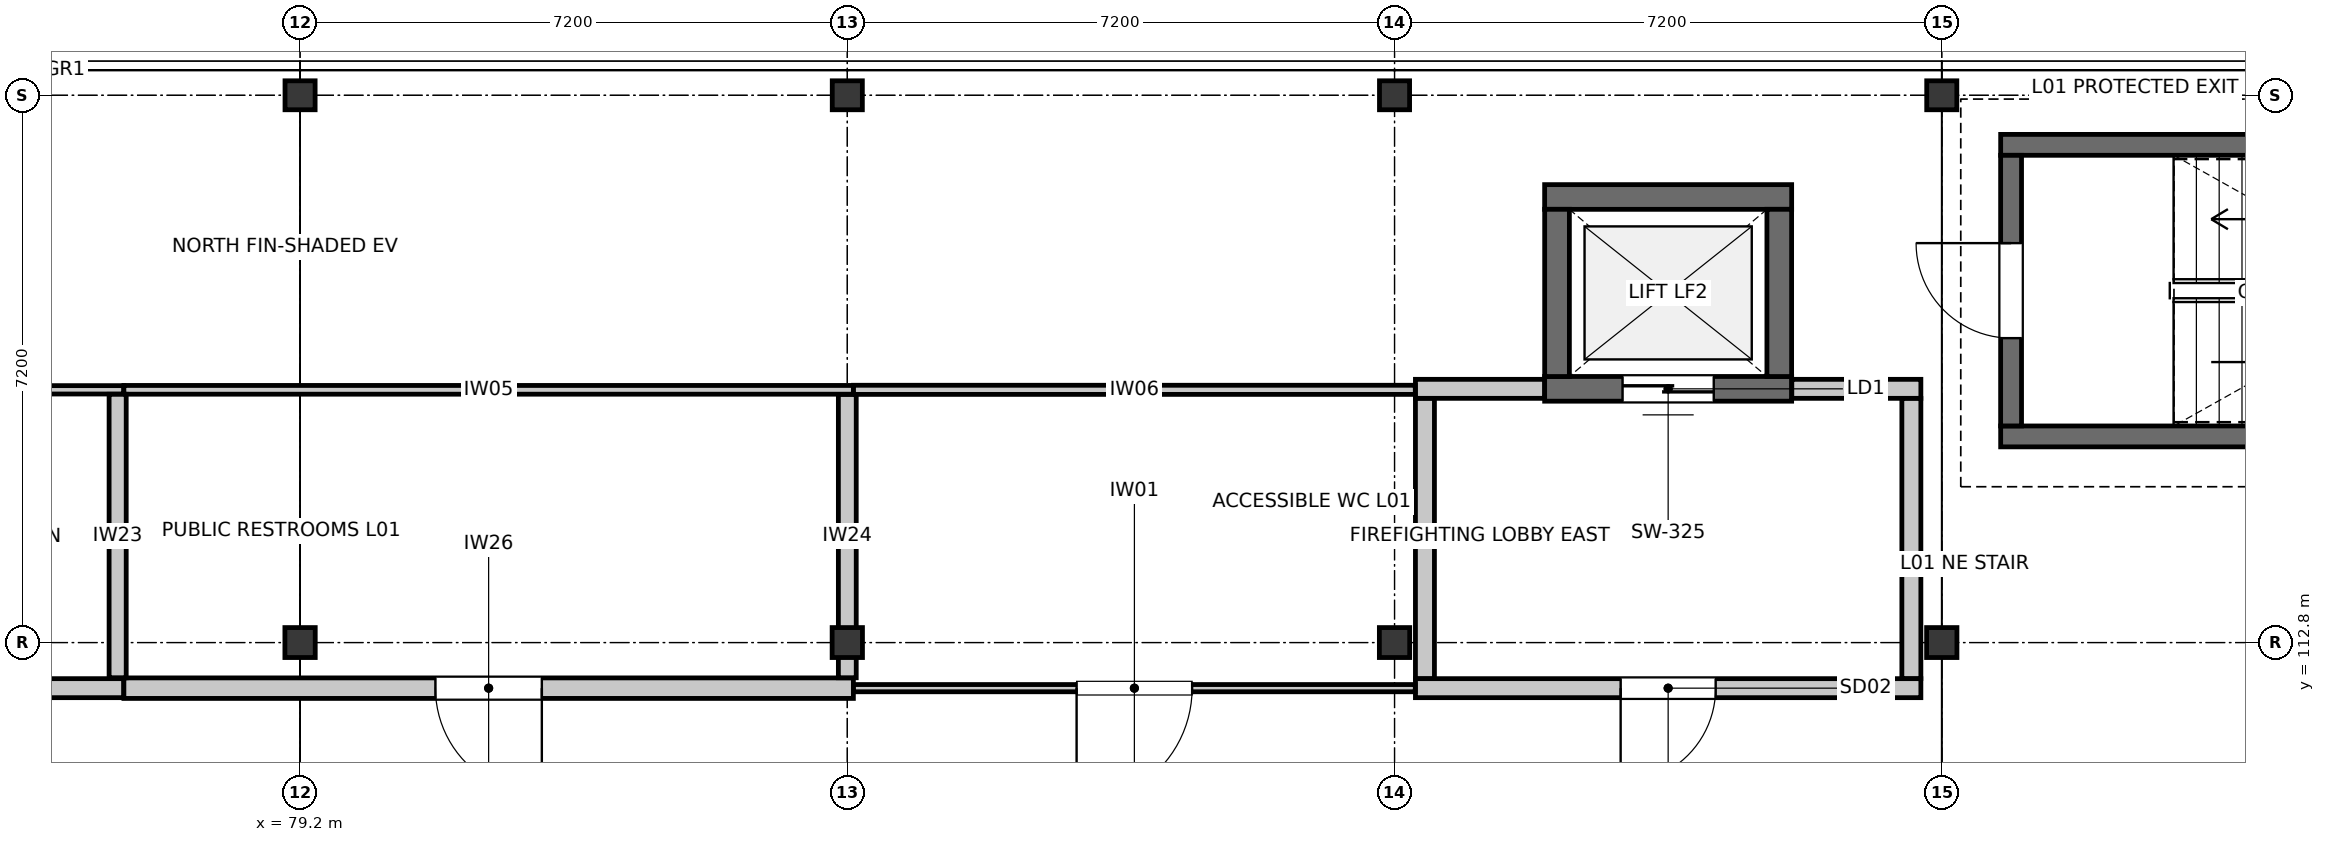
"""IFC4 building model, lengths in metres.
Left out: names, types, materials, properties, quantities, classifications, styles, units other than length and angle.
Written with IfcOpenShell. Run it as: python <this file> out.ifc"""

import sys

from ifc_helpers import new_model, si_unit, direction, frame, frame_2d, origin, origin_2d, place, context, subcontext, project, spatial, rectangle, i_section, extrude, element, fill, save


model = new_model("IFC4")
c1 = context("Model", 3, precision=1e-05, world=origin(), true_north=direction((0.0, 1.0)))
c2 = subcontext(c1, "Body", "Model", "MODEL_VIEW")
j1 = project(units=[si_unit("LENGTHUNIT", "METRE"), si_unit("PLANEANGLEUNIT", "RADIAN")], contexts=[c1])
p1 = place(None, origin())
s1 = spatial("IfcSite", under=j1, at=p1, CompositionType="ELEMENT")
p2 = place(p1, origin())
s2 = spatial("IfcBuilding", under=s1, at=p2, CompositionType="ELEMENT")
p3 = place(p2, frame((0.0, 0.0, 5.4)))
s3 = spatial("IfcBuildingStorey", under=s2, at=p3, CompositionType="ELEMENT", Elevation=5.4)
p4 = place(p3, frame((79.2, 112.8, 0.0), z_axis=(0.0, 0.0, 1.0), x_axis=(1.0, 0.0, 0.0)))
e1 = element("IfcColumn", 1, at=p4, inside=s3, PredefinedType="COLUMN", context=c2, shape_type="SweptSolid", body=[
    extrude(i_section(OverallWidth=0.399, OverallDepth=0.394, WebThickness=0.023, FlangeThickness=0.037, FilletRadius=0.015, at=origin_2d()), origin(), (0.0, 0.0, 1.0), 3.9),
])
p5 = place(p3, frame((79.2, 120.0, 0.0), z_axis=(0.0, 0.0, 1.0), x_axis=(1.0, 0.0, 0.0)))
e2 = element("IfcColumn", 2, at=p5, inside=s3, PredefinedType="COLUMN", context=c2, shape_type="SweptSolid", body=[
    extrude(i_section(OverallWidth=0.396, OverallDepth=0.381, WebThickness=0.019, FlangeThickness=0.03, FilletRadius=0.015, at=origin_2d()), origin(), (0.0, 0.0, 1.0), 3.9),
])
p6 = place(p3, frame((86.4, 112.8, 0.0), z_axis=(0.0, 0.0, 1.0), x_axis=(1.0, 0.0, 0.0)))
e3 = element("IfcColumn", 3, at=p6, inside=s3, PredefinedType="COLUMN", context=c2, shape_type="SweptSolid", body=[
    extrude(i_section(OverallWidth=0.399, OverallDepth=0.394, WebThickness=0.023, FlangeThickness=0.037, FilletRadius=0.015, at=origin_2d()), origin(), (0.0, 0.0, 1.0), 3.9),
])
p7 = place(p3, frame((86.4, 120.0, 0.0), z_axis=(0.0, 0.0, 1.0), x_axis=(1.0, 0.0, 0.0)))
e4 = element("IfcColumn", 4, at=p7, inside=s3, PredefinedType="COLUMN", context=c2, shape_type="SweptSolid", body=[
    extrude(i_section(OverallWidth=0.396, OverallDepth=0.381, WebThickness=0.019, FlangeThickness=0.03, FilletRadius=0.015, at=origin_2d()), origin(), (0.0, 0.0, 1.0), 3.9),
])
p8 = place(p3, frame((93.6, 112.8, 0.0), z_axis=(0.0, 0.0, 1.0), x_axis=(1.0, 0.0, 0.0)))
e5 = element("IfcColumn", 5, at=p8, inside=s3, PredefinedType="COLUMN", context=c2, shape_type="SweptSolid", body=[
    extrude(i_section(OverallWidth=0.399, OverallDepth=0.394, WebThickness=0.023, FlangeThickness=0.037, FilletRadius=0.015, at=origin_2d()), origin(), (0.0, 0.0, 1.0), 3.9),
])
p9 = place(p3, frame((93.6, 120.0, 0.0), z_axis=(0.0, 0.0, 1.0), x_axis=(1.0, 0.0, 0.0)))
e6 = element("IfcColumn", 6, at=p9, inside=s3, PredefinedType="COLUMN", context=c2, shape_type="SweptSolid", body=[
    extrude(i_section(OverallWidth=0.396, OverallDepth=0.381, WebThickness=0.019, FlangeThickness=0.03, FilletRadius=0.015, at=origin_2d()), origin(), (0.0, 0.0, 1.0), 3.9),
])
p10 = place(p3, frame((100.8, 112.8, 0.0), z_axis=(0.0, 0.0, 1.0), x_axis=(1.0, 0.0, 0.0)))
e7 = element("IfcColumn", 7, at=p10, inside=s3, PredefinedType="COLUMN", context=c2, shape_type="SweptSolid", body=[
    extrude(i_section(OverallWidth=0.399, OverallDepth=0.394, WebThickness=0.023, FlangeThickness=0.037, FilletRadius=0.015, at=origin_2d()), origin(), (0.0, 0.0, 1.0), 3.9),
])
p11 = place(p3, frame((100.8, 120.0, 0.0), z_axis=(0.0, 0.0, 1.0), x_axis=(1.0, 0.0, 0.0)))
e8 = element("IfcColumn", 8, at=p11, inside=s3, PredefinedType="COLUMN", context=c2, shape_type="SweptSolid", body=[
    extrude(i_section(OverallWidth=0.396, OverallDepth=0.381, WebThickness=0.019, FlangeThickness=0.03, FilletRadius=0.015, at=origin_2d()), origin(), (0.0, 0.0, 1.0), 3.9),
])
for number, where, z_axis, x_axis in (
    (9, (110.475, 115.512, 0.0), (0.0, 0.0, 1.0), (-1.0, 0.0, 0.0)),
    (10, (101.575, 119.348, 0.0), (0.0, 0.0, 1.0), (1.0, 0.0, 0.0)),
):
    element("IfcWall", number, at=place(p3, frame(where, z_axis=z_axis, x_axis=x_axis)), inside=s3, PredefinedType="SOLIDWALL", context=c2, shape_type="SweptSolid", body=[
        extrude(rectangle(XDim=8.9, YDim=0.275, at=frame_2d((4.45, 0.0))), origin(), (0.0, 0.0, 1.0), 3.67),
    ])
p12 = place(p3, frame((101.712, 115.65, 0.0), z_axis=(0.0, 0.0, 1.0), x_axis=(0.0, 1.0, 0.0)))
e11 = element("IfcWall", 11, at=p12, inside=s3, PredefinedType="SOLIDWALL", context=c2, shape_type="SweptSolid", body=[
    extrude(rectangle(XDim=3.56, YDim=0.275, at=frame_2d((1.78, 0.0))), origin(), (0.0, 0.0, 1.0), 3.67),
])
p13 = place(p12, frame((1.155, 0.0, 0.0)))
e12 = element("IfcOpeningElement", 12, at=p13, cuts=e11, PredefinedType="OPENING", context=c2, shape_type="SweptSolid", body=[
    extrude(rectangle(XDim=1.25, YDim=2.2, at=frame_2d((0.625, 1.1))), frame((0.0, 0.147, 0.0), z_axis=(0.0, -1.0, 0.0), x_axis=(1.0, 0.0, 0.0)), (0.0, 0.0, 1.0), 0.295),
])
p14 = place(p3, frame((98.825, 116.138, 0.0), z_axis=(0.0, 0.0, 1.0), x_axis=(-1.0, 0.0, 0.0)))
e13 = element("IfcWall", 13, at=p14, inside=s3, PredefinedType="SHEAR", context=c2, shape_type="SweptSolid", body=[
    extrude(rectangle(XDim=3.25, YDim=0.325, at=frame_2d((1.625, 0.0))), origin(), (0.0, 0.0, 1.0), 3.67),
])
p15 = place(p14, frame((1.025, 0.0, 0.0)))
e14 = element("IfcOpeningElement", 14, at=p15, cuts=e13, PredefinedType="OPENING", context=c2, shape_type="SweptSolid", body=[
    extrude(rectangle(XDim=1.2, YDim=2.2, at=frame_2d((0.6, 1.1))), frame((0.0, 0.172, 0.0), z_axis=(0.0, -1.0, 0.0), x_axis=(1.0, 0.0, 0.0)), (0.0, 0.0, 1.0), 0.345),
])
p16 = place(p3, frame((95.575, 118.662, 0.0), z_axis=(0.0, 0.0, 1.0), x_axis=(1.0, 0.0, 0.0)))
e15 = element("IfcWall", 15, at=p16, inside=s3, PredefinedType="SHEAR", context=c2, shape_type="SweptSolid", body=[
    extrude(rectangle(XDim=3.25, YDim=0.325, at=frame_2d((1.625, 0.0))), origin(), (0.0, 0.0, 1.0), 3.67),
])
for number, where, z_axis, x_axis in (
    (16, (95.738, 116.3, 0.0), (0.0, 0.0, 1.0), (0.0, 1.0, 0.0)),
    (17, (98.662, 118.5, 0.0), (0.0, 0.0, 1.0), (0.0, -1.0, 0.0)),
):
    element("IfcWall", number, at=place(p3, frame(where, z_axis=z_axis, x_axis=x_axis)), inside=s3, PredefinedType="SHEAR", context=c2, shape_type="SweptSolid", body=[
        extrude(rectangle(XDim=2.2, YDim=0.325, at=frame_2d((1.1, 0.0))), origin(), (0.0, 0.0, 1.0), 3.67),
    ])
p17 = place(p3, frame((100.525, 112.2, 0.0), z_axis=(0.0, 0.0, 1.0), x_axis=(-1.0, 0.0, 0.0)))
e18 = element("IfcWall", 18, at=p17, inside=s3, PredefinedType="PARTITIONING", context=c2, shape_type="SweptSolid", body=[
    extrude(rectangle(XDim=6.65, YDim=0.25, at=frame_2d((3.325, 0.0))), origin(), (0.0, 0.0, 1.0), 2.967),
])
p18 = place(p17, frame((2.7, 0.0, 0.0)))
e19 = element("IfcOpeningElement", 19, at=p18, cuts=e18, PredefinedType="OPENING", context=c2, shape_type="SweptSolid", body=[
    extrude(rectangle(XDim=1.25, YDim=2.2, at=frame_2d((0.625, 1.1))), frame((0.0, 0.135, 0.0), z_axis=(0.0, -1.0, 0.0), x_axis=(1.0, 0.0, 0.0)), (0.0, 0.0, 1.0), 0.27),
])
for number, where, z_axis, x_axis in (
    (20, (93.875, 116.138, 0.0), (0.0, 0.0, 1.0), (1.0, 0.0, 0.0)),
    (21, (98.827, 116.138, 0.0), (0.0, 0.0, 1.0), (1.0, 0.0, 0.0)),
):
    element("IfcWall", number, at=place(p3, frame(where, z_axis=z_axis, x_axis=x_axis)), inside=s3, PredefinedType="PARTITIONING", context=c2, shape_type="SweptSolid", body=[
        extrude(rectangle(XDim=1.698, YDim=0.25, at=frame_2d((0.849, 0.0))), origin(), (0.0, 0.0, 1.0), 2.967),
    ])
for number, where, z_axis, x_axis in (
    (22, (94.0, 112.327, 0.0), (0.0, 0.0, 1.0), (0.0, 1.0, 0.0)),
    (23, (100.4, 116.011, 0.0), (0.0, 0.0, 1.0), (0.0, -1.0, 0.0)),
):
    element("IfcWall", number, at=place(p3, frame(where, z_axis=z_axis, x_axis=x_axis)), inside=s3, PredefinedType="PARTITIONING", context=c2, shape_type="SweptSolid", body=[
        extrude(rectangle(XDim=3.684, YDim=0.25, at=frame_2d((1.842, 0.0))), origin(), (0.0, 0.0, 1.0), 2.967),
    ])
p19 = place(p3, frame((76.88, 112.2, 0.0), z_axis=(0.0, 0.0, 1.0), x_axis=(-1.0, 0.0, 0.0)))
e24 = element("IfcWall", 24, at=p19, inside=s3, PredefinedType="PARTITIONING", context=c2, shape_type="SweptSolid", body=[
    extrude(rectangle(XDim=12.353, YDim=0.25, at=frame_2d((6.176, 0.0))), origin(), (0.0, 0.0, 1.0), 2.967),
])
p20 = place(p19, frame((5.536, 0.0, 0.0)))
e25 = element("IfcOpeningElement", 25, at=p20, cuts=e24, PredefinedType="OPENING", context=c2, shape_type="SweptSolid", body=[
    extrude(rectangle(XDim=1.28, YDim=2.28, at=frame_2d((0.64, 1.14))), frame((0.0, 0.135, 0.0), z_axis=(0.0, -1.0, 0.0), x_axis=(1.0, 0.0, 0.0)), (0.0, 0.0, 1.0), 0.27),
])
p21 = place(p3, frame((86.48, 112.2, 0.0), z_axis=(0.0, 0.0, 1.0), x_axis=(-1.0, 0.0, 0.0)))
e26 = element("IfcWall", 26, at=p21, inside=s3, PredefinedType="PARTITIONING", context=c2, shape_type="SweptSolid", body=[
    extrude(rectangle(XDim=9.598, YDim=0.27, at=frame_2d((4.799, 0.0))), origin(), (0.0, 0.0, 1.0), 2.967),
])
p22 = place(p21, frame((4.099, 0.0, 0.0)))
e27 = element("IfcOpeningElement", 27, at=p22, cuts=e26, PredefinedType="OPENING", context=c2, shape_type="SweptSolid", body=[
    extrude(rectangle(XDim=1.4, YDim=2.28, at=frame_2d((0.7, 1.14))), frame((0.0, 0.145, 0.0), z_axis=(0.0, -1.0, 0.0), x_axis=(1.0, 0.0, 0.0)), (0.0, 0.0, 1.0), 0.29),
])
p23 = place(p3, frame((93.873, 112.2, 0.0), z_axis=(0.0, 0.0, 1.0), x_axis=(-1.0, 0.0, 0.0)))
e28 = element("IfcWall", 28, at=p23, inside=s3, PredefinedType="PARTITIONING", context=c2, shape_type="SweptSolid", body=[
    extrude(rectangle(XDim=7.391, YDim=0.095, at=frame_2d((3.696, 0.0))), origin(), (0.0, 0.0, 1.0), 2.967),
])
p24 = place(p23, frame((2.936, 0.0, 0.0)))
e29 = element("IfcOpeningElement", 29, at=p24, cuts=e28, PredefinedType="OPENING", context=c2, shape_type="SweptSolid", body=[
    extrude(rectangle(XDim=1.52, YDim=2.28, at=frame_2d((0.76, 1.14))), frame((0.0, 0.057, 0.0), z_axis=(0.0, -1.0, 0.0), x_axis=(1.0, 0.0, 0.0)), (0.0, 0.0, 1.0), 0.115),
])
p25 = place(p3, frame((64.527, 116.125, 0.0), z_axis=(0.0, 0.0, 1.0), x_axis=(1.0, 0.0, 0.0)))
e30 = element("IfcWall", 30, at=p25, inside=s3, PredefinedType="PARTITIONING", context=c2, shape_type="SweptSolid", body=[
    extrude(rectangle(XDim=12.353, YDim=0.11, at=frame_2d((6.176, 0.0))), origin(), (0.0, 0.0, 1.0), 2.967),
])
p26 = place(p3, frame((76.882, 116.125, 0.0), z_axis=(0.0, 0.0, 1.0), x_axis=(1.0, 0.0, 0.0)))
e31 = element("IfcWall", 31, at=p26, inside=s3, PredefinedType="PARTITIONING", context=c2, shape_type="SweptSolid", body=[
    extrude(rectangle(XDim=9.598, YDim=0.115, at=frame_2d((4.799, 0.0))), origin(), (0.0, 0.0, 1.0), 2.967),
])
p27 = place(p3, frame((86.482, 116.125, 0.0), z_axis=(0.0, 0.0, 1.0), x_axis=(1.0, 0.0, 0.0)))
e32 = element("IfcWall", 32, at=p27, inside=s3, PredefinedType="PARTITIONING", context=c2, shape_type="SweptSolid", body=[
    extrude(rectangle(XDim=7.391, YDim=0.12, at=frame_2d((3.696, 0.0))), origin(), (0.0, 0.0, 1.0), 2.967),
])
p28 = place(p3, frame((76.8, 116.066, 0.0), z_axis=(0.0, 0.0, 1.0), x_axis=(0.0, -1.0, 0.0)))
e33 = element("IfcWall", 33, at=p28, inside=s3, PredefinedType="PARTITIONING", context=c2, shape_type="SweptSolid", body=[
    extrude(rectangle(XDim=3.729, YDim=0.225, at=frame_2d((1.865, 0.0))), origin(), (0.0, 0.0, 1.0), 2.967),
])
p29 = place(p3, frame((86.4, 116.063, 0.0), z_axis=(0.0, 0.0, 1.0), x_axis=(0.0, -1.0, 0.0)))
e34 = element("IfcWall", 34, at=p29, inside=s3, PredefinedType="PARTITIONING", context=c2, shape_type="SweptSolid", body=[
    extrude(rectangle(XDim=3.726, YDim=0.235, at=frame_2d((1.863, 0.0))), origin(), (0.0, 0.0, 1.0), 2.967),
])
p30 = place(p13, origin())
e35 = element("IfcDoor", 35, at=p30, inside=s3, OperationType="SINGLE_SWING_RIGHT", PredefinedType="DOOR", context=c2, shape_type="SweptSolid", body=[
    extrude(rectangle(XDim=1.25, YDim=2.2, at=frame_2d((0.625, 1.1))), frame((0.0, 0.025, 0.0), z_axis=(0.0, -1.0, 0.0), x_axis=(1.0, 0.0, 0.0)), (0.0, 0.0, 1.0), 0.05),
])
fill(e12, e35)
p31 = place(p15, origin())
e36 = element("IfcDoor", 36, at=p31, inside=s3, OperationType="DOUBLE_DOOR_SLIDING", PredefinedType="DOOR", context=c2, shape_type="SweptSolid", body=[
    extrude(rectangle(XDim=1.2, YDim=2.2, at=frame_2d((0.6, 1.1))), frame((0.0, 0.025, 0.0), z_axis=(0.0, -1.0, 0.0), x_axis=(1.0, 0.0, 0.0)), (0.0, 0.0, 1.0), 0.05),
])
fill(e14, e36)
p32 = place(p18, origin())
e37 = element("IfcDoor", 37, at=p32, inside=s3, OperationType="SINGLE_SWING_RIGHT", PredefinedType="DOOR", context=c2, shape_type="SweptSolid", body=[
    extrude(rectangle(XDim=1.25, YDim=2.2, at=frame_2d((0.625, 1.1))), frame((0.0, 0.025, 0.0), z_axis=(0.0, -1.0, 0.0), x_axis=(1.0, 0.0, 0.0)), (0.0, 0.0, 1.0), 0.05),
])
fill(e19, e37)
p33 = place(p22, origin())
e38 = element("IfcDoor", 38, at=p33, inside=s3, OperationType="SINGLE_SWING_LEFT", PredefinedType="DOOR", context=c2, shape_type="SweptSolid", body=[
    extrude(rectangle(XDim=1.4, YDim=2.28, at=frame_2d((0.7, 1.14))), frame((0.0, 0.025, 0.0), z_axis=(0.0, -1.0, 0.0), x_axis=(1.0, 0.0, 0.0)), (0.0, 0.0, 1.0), 0.05),
])
fill(e27, e38)
p34 = place(p24, origin())
e39 = element("IfcDoor", 39, at=p34, inside=s3, OperationType="SINGLE_SWING_RIGHT", PredefinedType="DOOR", context=c2, shape_type="SweptSolid", body=[
    extrude(rectangle(XDim=1.52, YDim=2.28, at=frame_2d((0.76, 1.14))), frame((0.0, 0.025, 0.0), z_axis=(0.0, -1.0, 0.0), x_axis=(1.0, 0.0, 0.0)), (0.0, 0.0, 1.0), 0.05),
])
fill(e29, e39)
save(model, sys.argv[1])
